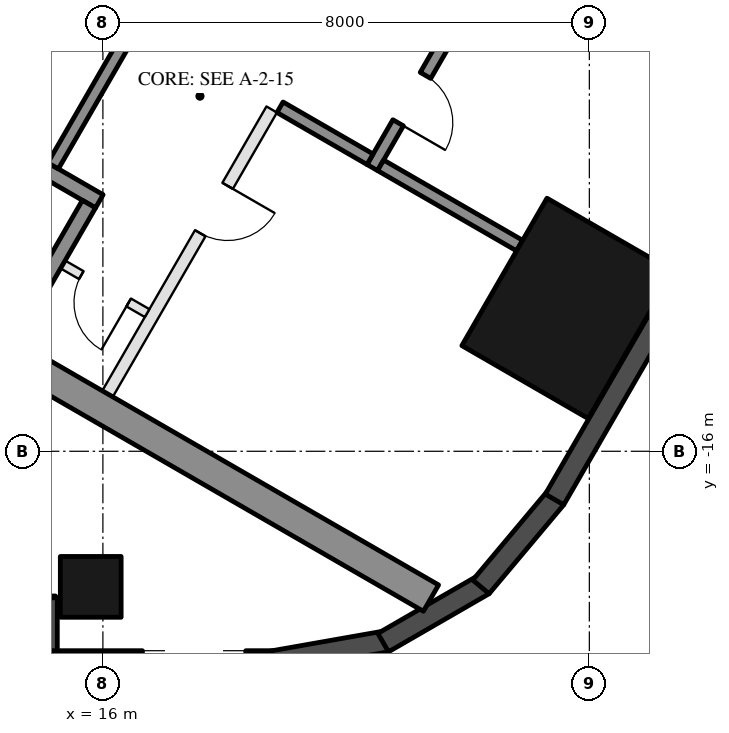
"""IFC4 building model, lengths in metres.
Left out: names, types, materials, properties, quantities, classifications, styles, units other than length and angle.
Written with IfcOpenShell. Run it as: python <this file> out.ifc"""

import sys

from ifc_helpers import new_model, si_unit, direction, frame, frame_2d, origin, origin_2d, place, context, subcontext, project, spatial, rectangle, hollow_rectangle, extrude, element, fill, save


model = new_model("IFC4")
c1 = context("Model", 3, precision=1e-05, world=origin(), true_north=direction((0.0, 1.0)))
c2 = subcontext(c1, "Body", "Model", "MODEL_VIEW")
j1 = project(units=[si_unit("LENGTHUNIT", "METRE"), si_unit("PLANEANGLEUNIT", "RADIAN")], contexts=[c1])
p1 = place(None, origin())
s1 = spatial("IfcSite", under=j1, at=p1, CompositionType="ELEMENT")
p2 = place(p1, origin())
s2 = spatial("IfcBuilding", under=s1, at=p2, CompositionType="ELEMENT")
p3 = place(p2, frame((0.0, 0.0, 76.1)))
s3 = spatial("IfcBuildingStorey", under=s2, at=p3, CompositionType="ELEMENT", Elevation=76.1)
p4 = place(p3, frame((15.8, -18.23, 0.0), z_axis=(0.0, 0.0, 1.0), x_axis=(-1.0, 0.0, 0.0)))
e1 = element("IfcColumn", 1, at=p4, inside=s3, PredefinedType="COLUMN", context=c2, shape_type="SweptSolid", body=[
    extrude(hollow_rectangle(XDim=1.0, YDim=1.0, WallThickness=0.045, at=origin_2d()), origin(), (0.0, 0.0, 1.0), 3.7),
])
p5 = place(p3, frame((23.643, -13.65, 0.0), z_axis=(0.0, 0.0, 1.0), x_axis=(0.5, 0.866025403784, 0.0)))
e2 = element("IfcColumn", 2, at=p5, inside=s3, PredefinedType="COLUMN", context=c2, shape_type="SweptSolid", body=[
    extrude(hollow_rectangle(XDim=2.8, YDim=2.4, WallThickness=0.07, at=origin_2d()), origin(), (0.0, 0.0, 1.0), 3.7),
])
p6 = place(p3, frame((8.48, -18.555, 0.0), z_axis=(0.0, 0.0, 1.0), x_axis=(1.0, 0.0, 0.0)))
e3 = element("IfcWall", 3, at=p6, inside=s3, PredefinedType="SOLIDWALL", context=c2, shape_type="SweptSolid", body=[
    extrude(rectangle(XDim=6.74, YDim=0.35, at=frame_2d((3.37, 0.0))), origin(), (0.0, 0.0, 1.0), 3.55),
])
p7 = place(p6, frame((3.57, 0.0, 0.0)))
e4 = element("IfcOpeningElement", 4, at=p7, cuts=e3, PredefinedType="OPENING", context=c2, shape_type="SweptSolid", body=[
    extrude(rectangle(XDim=2.4, YDim=2.4, at=frame_2d((1.2, 1.2))), frame((0.0, 0.185, 0.0), z_axis=(0.0, -1.0, 0.0), x_axis=(1.0, 0.0, 0.0)), (0.0, 0.0, 1.0), 0.37),
])
p8 = place(p6, frame((0.77, 0.0, 0.3)))
e5 = element("IfcOpeningElement", 5, at=p8, cuts=e3, PredefinedType="OPENING", context=c2, shape_type="SweptSolid", body=[
    extrude(rectangle(XDim=2.5, YDim=2.65, at=frame_2d((1.25, 1.325))), frame((0.0, 0.185, 0.0), z_axis=(0.0, -1.0, 0.0), x_axis=(1.0, 0.0, 0.0)), (0.0, 0.0, 1.0), 0.37),
])
p9 = place(p3, frame((15.075, -18.41, 0.0), z_axis=(0.0, 0.0, 1.0), x_axis=(0.0, -1.0, 0.0)))
e6 = element("IfcWall", 6, at=p9, inside=s3, PredefinedType="SOLIDWALL", context=c2, shape_type="SweptSolid", body=[
    extrude(rectangle(XDim=1.22, YDim=0.35, at=frame_2d((0.61, 0.0))), origin(), (0.0, 0.0, 1.0), 3.55),
])
p10 = place(p3, frame((14.9, -19.455, 0.0), z_axis=(0.0, 0.0, 1.0), x_axis=(1.0, 0.0, 0.0)))
e7 = element("IfcWall", 7, at=p10, inside=s3, PredefinedType="SOLIDWALL", context=c2, shape_type="SweptSolid", body=[
    extrude(rectangle(XDim=3.916, YDim=0.35, at=frame_2d((1.958, 0.0))), origin(), (0.0, 0.0, 1.0), 3.55),
])
p11 = place(p10, frame((1.75, 0.0, 0.3)))
e8 = element("IfcOpeningElement", 8, at=p11, cuts=e7, PredefinedType="OPENING", context=c2, shape_type="SweptSolid", body=[
    extrude(rectangle(XDim=1.7, YDim=2.65, at=frame_2d((0.85, 1.325))), frame((0.0, 0.185, 0.0), z_axis=(0.0, -1.0, 0.0), x_axis=(1.0, 0.0, 0.0)), (0.0, 0.0, 1.0), 0.37),
])
p12 = place(p3, frame((18.785, -19.458, 0.0), z_axis=(0.0, 0.0, 1.0), x_axis=(0.984798995425, 0.173697837091, 0.0)))
e9 = element("IfcWall", 9, at=p12, inside=s3, PredefinedType="SOLIDWALL", context=c2, shape_type="SweptSolid", body=[
    extrude(rectangle(XDim=1.91, YDim=0.35, at=frame_2d((0.955, 0.0))), origin(), (0.0, 0.0, 1.0), 3.55),
])
for number, where, z_axis, x_axis in (
    (10, (20.61, -19.147, 0.0), (0.0, 0.0, 1.0), (0.866, 0.5, 0.0)),
    (11, (22.217, -18.231, 0.0), (0.0, 0.0, 1.0), (0.643, 0.766, 0.0)),
):
    element("IfcWall", number, at=place(p3, frame(where, z_axis=z_axis, x_axis=x_axis)), inside=s3, PredefinedType="SOLIDWALL", context=c2, shape_type="SweptSolid", body=[
        extrude(rectangle(XDim=1.91, YDim=0.35, at=frame_2d((0.955, 0.0))), origin(), (0.0, 0.0, 1.0), 3.55),
    ])
p13 = place(p3, frame((23.427, -16.792, 0.0), z_axis=(0.0, 0.0, 1.0), x_axis=(0.500018773155, 0.866014564827, 0.0)))
e12 = element("IfcWall", 12, at=p13, inside=s3, PredefinedType="SOLIDWALL", context=c2, shape_type="SweptSolid", body=[
    extrude(rectangle(XDim=5.658, YDim=0.35, at=frame_2d((2.829, 0.0))), origin(), (0.0, 0.0, 1.0), 3.55),
])
for number, where, z_axis, x_axis in (
    (13, (8.547, -10.997, 0.0), (0.0, 0.0, 1.0), (0.866, -0.5, 0.0)),
    (14, (13.797, -1.903, 0.0), (0.0, 0.0, 1.0), (0.866, -0.5, 0.0)),
):
    element("IfcWall", number, at=place(p3, frame(where, z_axis=z_axis, x_axis=x_axis)), inside=s3, PredefinedType="SHEAR", context=c2, shape_type="SweptSolid", body=[
        extrude(rectangle(XDim=14.837, YDim=0.5, at=frame_2d((7.418, 0.0))), origin(), (0.0, 0.0, 1.0), 3.5),
    ])
p14 = place(p3, frame((10.356, -8.664, 0.0), z_axis=(0.0, 0.0, 1.0), x_axis=(0.866028629588, -0.499994412703, 0.0)))
e15 = element("IfcWall", 15, at=p14, inside=s3, PredefinedType="SHEAR", context=c2, shape_type="SweptSolid", body=[
    extrude(rectangle(XDim=6.45, YDim=0.25, at=frame_2d((3.225, 0.0))), origin(), (0.0, 0.0, 1.0), 3.5),
])
p15 = place(p14, frame((0.3, 0.0, 0.0)))
e16 = element("IfcOpeningElement", 16, at=p15, cuts=e15, PredefinedType="OPENING", context=c2, shape_type="SweptSolid", body=[
    extrude(rectangle(XDim=1.0, YDim=2.1, at=frame_2d((0.5, 1.05))), frame((0.0, 0.135, 0.0), z_axis=(0.0, -1.0, 0.0), x_axis=(1.0, 0.0, 0.0)), (0.0, 0.0, 1.0), 0.27),
])
p16 = place(p3, frame((14.496, -14.143, 0.0), z_axis=(0.0, 0.0, 1.0), x_axis=(0.500062241894, 0.865989465428, 0.0)))
e17 = element("IfcWall", 17, at=p16, inside=s3, PredefinedType="SHEAR", context=c2, shape_type="SweptSolid", body=[
    extrude(rectangle(XDim=2.55, YDim=0.25, at=frame_2d((1.275, 0.0))), origin(), (0.0, 0.0, 1.0), 3.5),
])
p17 = place(p3, frame((15.181, -11.305, 0.0), z_axis=(0.0, 0.0, 1.0), x_axis=(0.49994636267, 0.866056369097, 0.0)))
e18 = element("IfcWall", 18, at=p17, inside=s3, PredefinedType="SHEAR", context=c2, shape_type="SweptSolid", body=[
    extrude(rectangle(XDim=2.8, YDim=0.2, at=frame_2d((1.4, 0.0))), origin(), (0.0, 0.0, 1.0), 3.5),
])
p18 = place(p3, frame((20.43, -11.333, 0.0), z_axis=(0.0, 0.0, 1.0), x_axis=(0.500001309137, 0.866024647952, 0.0)))
e19 = element("IfcWall", 19, at=p18, inside=s3, PredefinedType="SHEAR", context=c2, shape_type="SweptSolid", body=[
    extrude(rectangle(XDim=2.4, YDim=0.2, at=frame_2d((1.2, 0.0))), origin(), (0.0, 0.0, 1.0), 3.5),
])
p19 = place(p18, frame((0.85, 0.0, 0.0)))
e20 = element("IfcOpeningElement", 20, at=p19, cuts=e19, PredefinedType="OPENING", context=c2, shape_type="SweptSolid", body=[
    extrude(rectangle(XDim=0.9, YDim=2.1, at=frame_2d((0.45, 1.05))), frame((0.0, 0.11, 0.0), z_axis=(0.0, -1.0, 0.0), x_axis=(1.0, 0.0, 0.0)), (0.0, 0.0, 1.0), 0.22),
])
p20 = place(p3, frame((18.913, -10.342, 0.0), z_axis=(0.0, 0.0, 1.0), x_axis=(0.866038183914, -0.499977863513, 0.0)))
e21 = element("IfcWall", 21, at=p20, inside=s3, PredefinedType="SHEAR", context=c2, shape_type="SweptSolid", body=[
    extrude(rectangle(XDim=1.71, YDim=0.2, at=frame_2d((0.855, 0.0))), origin(), (0.0, 0.0, 1.0), 3.5),
])
p21 = place(p3, frame((20.567, -11.297, 0.0), z_axis=(0.0, 0.0, 1.0), x_axis=(0.866060851709, -0.499938597367, 0.0)))
e22 = element("IfcWall", 22, at=p21, inside=s3, PredefinedType="SHEAR", context=c2, shape_type="SweptSolid", body=[
    extrude(rectangle(XDim=2.64, YDim=0.2, at=frame_2d((1.32, 0.0))), origin(), (0.0, 0.0, 1.0), 3.5),
])
p22 = place(p3, frame((16.076, -15.055, 0.0), z_axis=(0.0, 0.0, 1.0), x_axis=(0.499995103361, 0.866028230842, 0.0)))
e23 = element("IfcWall", 23, at=p22, inside=s3, PredefinedType="PARTITIONING", context=c2, shape_type="SweptSolid", body=[
    extrude(rectangle(XDim=5.4, YDim=0.2, at=frame_2d((2.7, 0.0))), origin(), (0.0, 0.0, 1.0), 3.5),
])
p23 = place(p22, frame((3.05, 0.0, 0.0)))
e24 = element("IfcOpeningElement", 24, at=p23, cuts=e23, PredefinedType="OPENING", context=c2, shape_type="SweptSolid", body=[
    extrude(rectangle(XDim=0.9, YDim=2.1, at=frame_2d((0.45, 1.05))), frame((0.0, 0.11, 0.0), z_axis=(0.0, -1.0, 0.0), x_axis=(1.0, 0.0, 0.0)), (0.0, 0.0, 1.0), 0.22),
])
p24 = place(p3, frame((15.342, -12.928, 0.0), z_axis=(0.0, 0.0, 1.0), x_axis=(0.865989903783, -0.500061482766, 0.0)))
e25 = element("IfcWall", 25, at=p24, inside=s3, PredefinedType="PARTITIONING", context=c2, shape_type="SweptSolid", body=[
    extrude(rectangle(XDim=1.6, YDim=0.15, at=frame_2d((0.8, 0.0))), origin(), (0.0, 0.0, 1.0), 3.5),
])
p25 = place(p24, frame((0.35, 0.0, 0.0)))
e26 = element("IfcOpeningElement", 26, at=p25, cuts=e25, PredefinedType="OPENING", context=c2, shape_type="SweptSolid", body=[
    extrude(rectangle(XDim=0.9, YDim=2.1, at=frame_2d((0.45, 1.05))), frame((0.0, 0.085, 0.0), z_axis=(0.0, -1.0, 0.0), x_axis=(1.0, 0.0, 0.0)), (0.0, 0.0, 1.0), 0.17),
])
p26 = place(p25, frame((0.9, 0.0, 0.0), z_axis=(0.0, 0.0, 1.0), x_axis=(-1.0, 0.0, 0.0)))
e27 = element("IfcDoor", 27, at=p26, inside=s3, OperationType="SINGLE_SWING_LEFT", PredefinedType="DOOR", context=c2, shape_type="SweptSolid", body=[
    extrude(rectangle(XDim=0.9, YDim=2.1, at=frame_2d((0.45, 1.05))), frame((0.0, 0.025, 0.0), z_axis=(0.0, -1.0, 0.0), x_axis=(1.0, 0.0, 0.0)), (0.0, 0.0, 1.0), 0.05),
])
fill(e26, e27)
p27 = place(p19, frame((0.9, 0.0, 0.0), z_axis=(0.0, 0.0, 1.0), x_axis=(-1.0, 0.0, 0.0)))
e28 = element("IfcDoor", 28, at=p27, inside=s3, OperationType="SINGLE_SWING_RIGHT", PredefinedType="DOOR", context=c2, shape_type="SweptSolid", body=[
    extrude(rectangle(XDim=0.9, YDim=2.1, at=frame_2d((0.45, 1.05))), frame((0.0, 0.025, 0.0), z_axis=(0.0, -1.0, 0.0), x_axis=(1.0, 0.0, 0.0)), (0.0, 0.0, 1.0), 0.05),
])
fill(e20, e28)
p28 = place(p23, frame((0.9, 0.0, 0.0), z_axis=(0.0, 0.0, 1.0), x_axis=(-1.0, 0.0, 0.0)))
e29 = element("IfcDoor", 29, at=p28, inside=s3, OperationType="SINGLE_SWING_LEFT", PredefinedType="DOOR", context=c2, shape_type="SweptSolid", body=[
    extrude(rectangle(XDim=0.9, YDim=2.1, at=frame_2d((0.45, 1.05))), frame((0.0, 0.025, 0.0), z_axis=(0.0, -1.0, 0.0), x_axis=(1.0, 0.0, 0.0)), (0.0, 0.0, 1.0), 0.05),
])
fill(e24, e29)
save(model, sys.argv[1])
